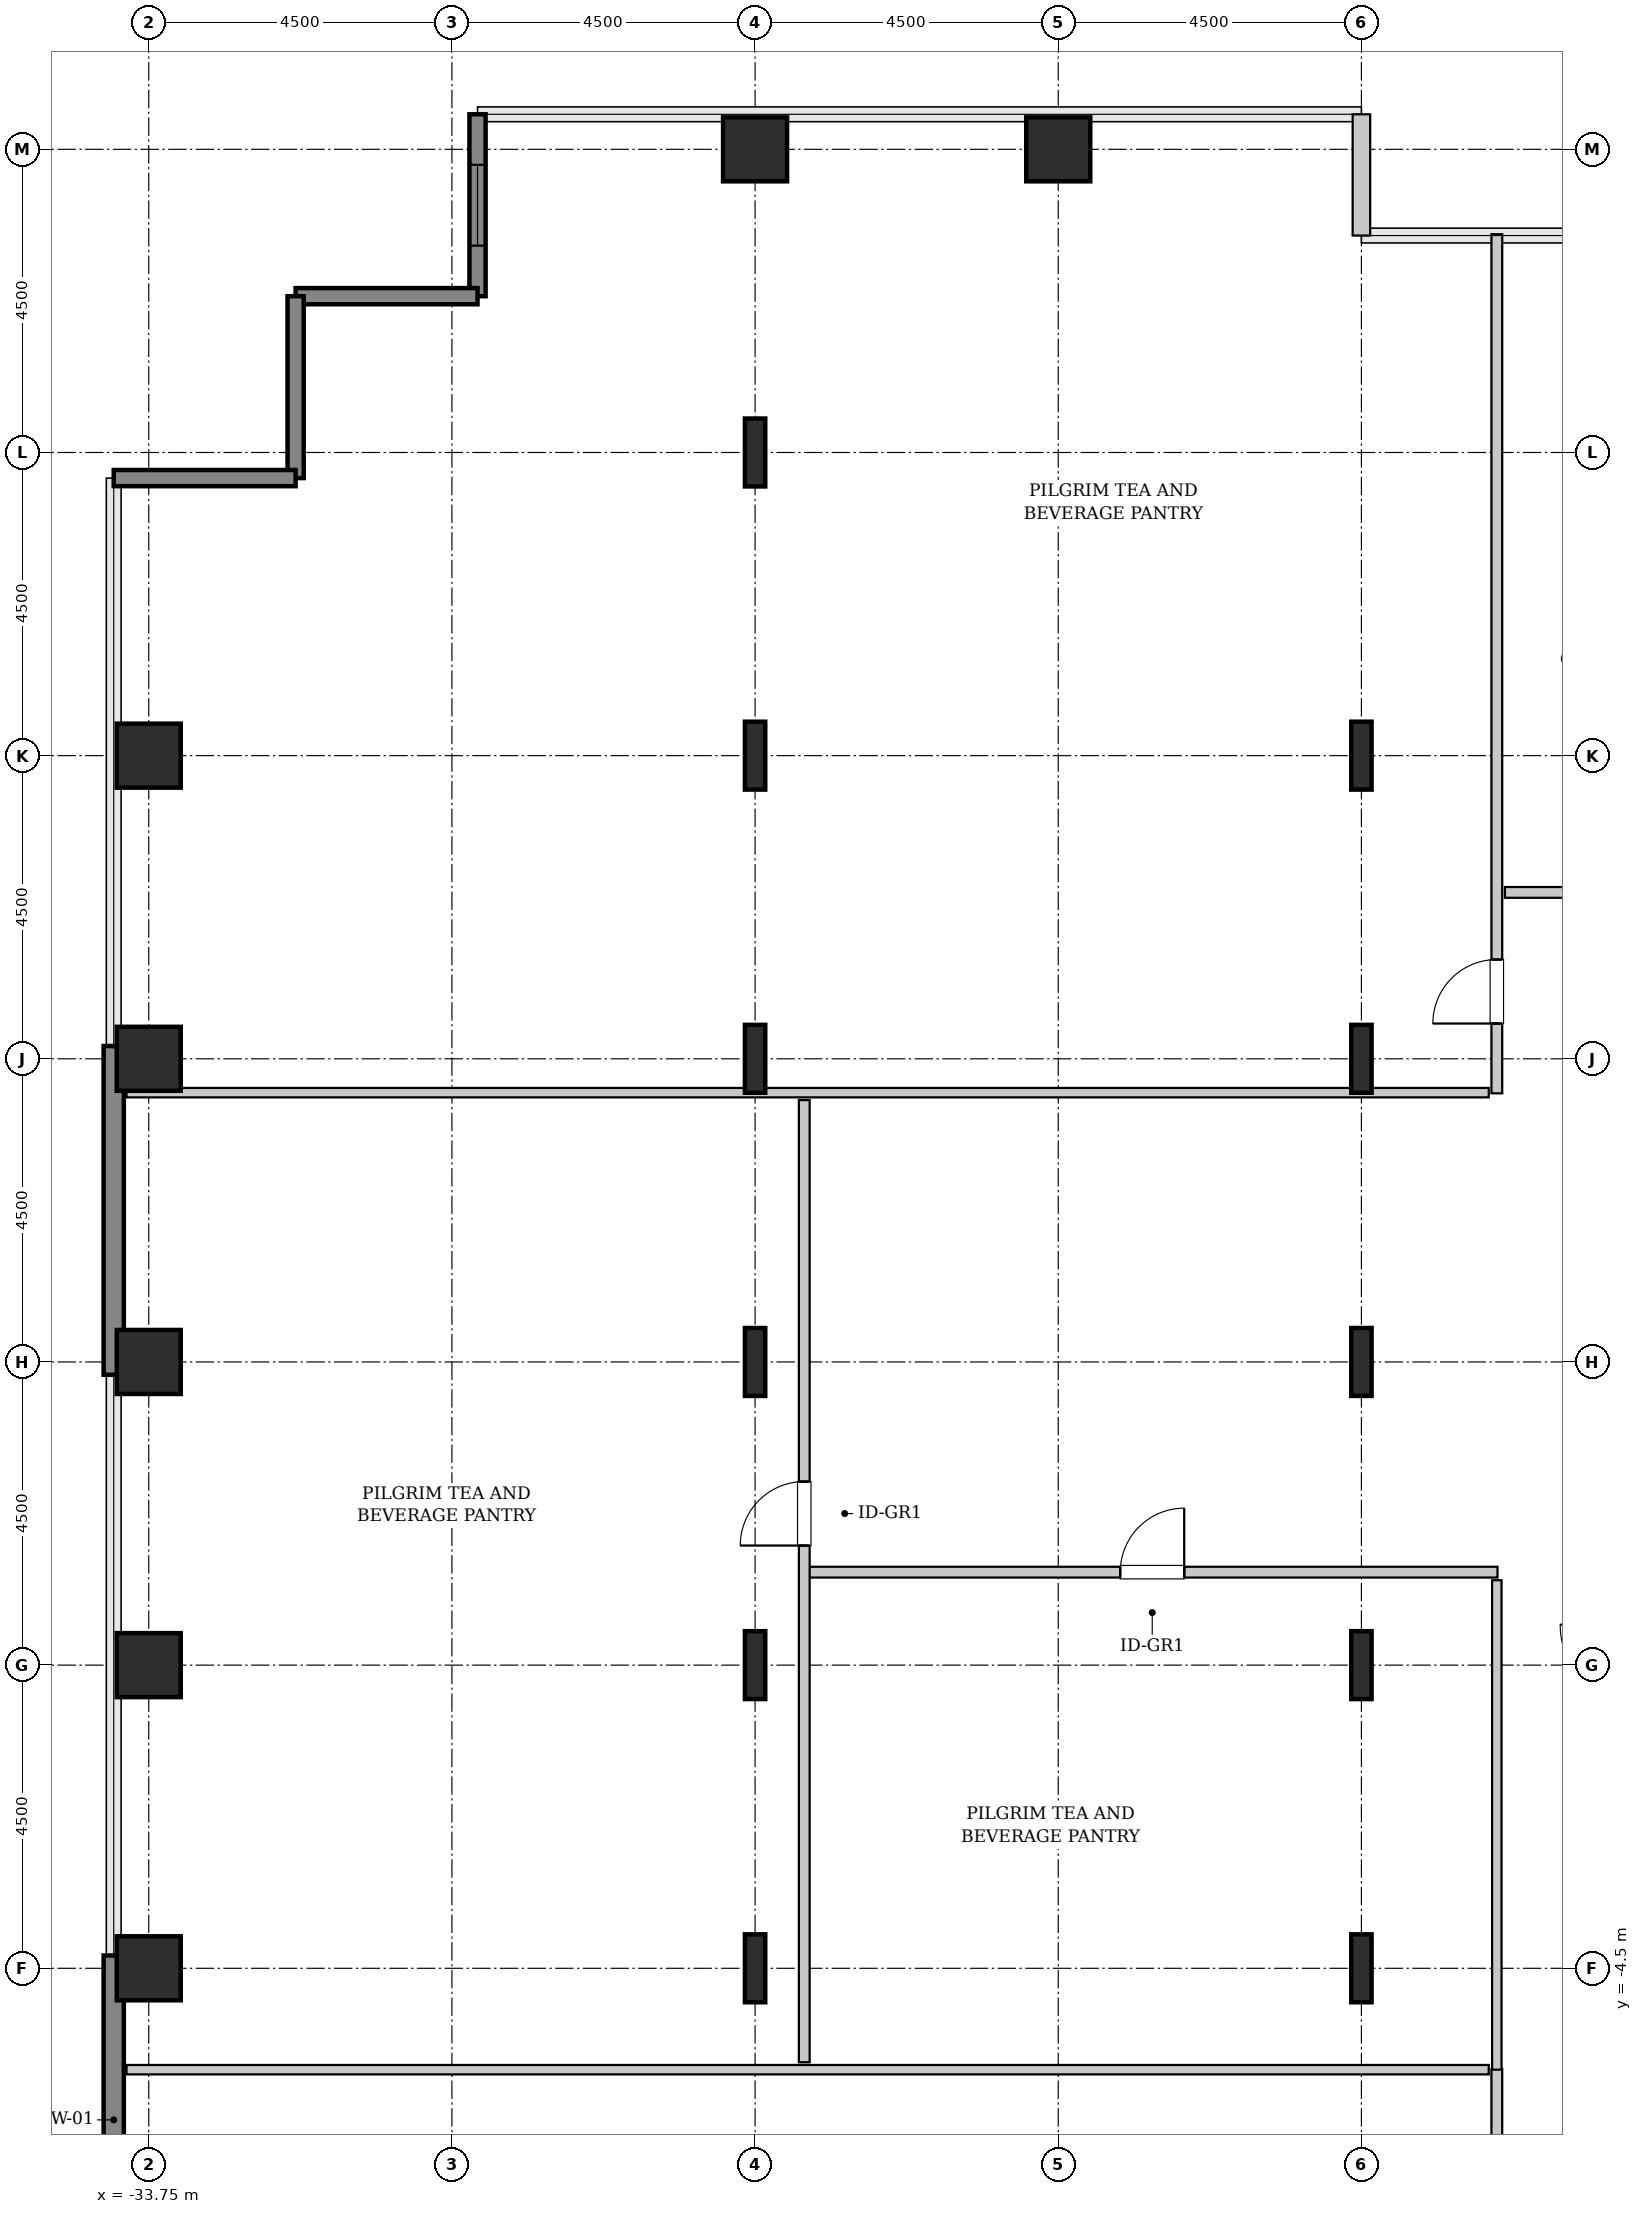
"""IFC4 building model, lengths in metres.
Left out: names, types, materials, properties, quantities, classifications, styles, units other than length and angle.
Written with IfcOpenShell. Run it as: python <this file> out.ifc"""

import sys

from ifc_helpers import new_model, si_unit, direction, frame, frame_2d, origin, origin_2d, place, context, subcontext, project, spatial, rectangle, hollow_rectangle, i_section, extrude, source, transform, mapped, element, fill, save


model = new_model("IFC4")
c1 = context("Model", 3, precision=1e-05, world=origin(), true_north=direction((0.0, 1.0)))
c2 = subcontext(c1, "Body", "Model", "MODEL_VIEW")
j1 = project(units=[si_unit("LENGTHUNIT", "METRE"), si_unit("PLANEANGLEUNIT", "RADIAN")], contexts=[c1])
p1 = place(None, origin())
s1 = spatial("IfcSite", under=j1, at=p1, CompositionType="ELEMENT")
p2 = place(p1, origin())
s2 = spatial("IfcBuilding", under=s1, at=p2, CompositionType="ELEMENT")
p3 = place(p2, frame((0.0, 0.0, 55.8)))
s3 = spatial("IfcBuildingStorey", under=s2, at=p3, CompositionType="ELEMENT", Elevation=55.8)
m1 = source(origin(), c2, "Body", "SweptSolid", [
    extrude(hollow_rectangle(XDim=0.95, YDim=0.95, WallThickness=0.045, InnerFilletRadius=0.045, OuterFilletRadius=0.09, at=origin_2d()), origin(), (0.0, 0.0, 1.0), 3.8),
])
for number, where, z_axis, x_axis in (
    (1, (-33.75, -4.5, 0.0), (0.0, 0.0, 1.0), (1.0, 0.0, 0.0)),
    (2, (-33.75, 0.0, 0.0), (0.0, 0.0, 1.0), (1.0, 0.0, 0.0)),
    (3, (-33.75, 4.5, 0.0), (0.0, 0.0, 1.0), (1.0, 0.0, 0.0)),
    (4, (-33.75, 9.0, 0.0), (0.0, 0.0, 1.0), (1.0, 0.0, 0.0)),
    (5, (-33.75, 13.5, 0.0), (0.0, 0.0, 1.0), (1.0, 0.0, 0.0)),
):
    element("IfcColumn", number, at=place(p3, frame(where, z_axis=z_axis, x_axis=x_axis)), inside=s3, PredefinedType="COLUMN", context=c2, shape_type="MappedRepresentation", body=[
        mapped(m1, transform((0.0, 0.0, 0.0), x_axis=(1.0, 0.0, 0.0), y_axis=(0.0, 1.0, 0.0), z_axis=(0.0, 0.0, 1.0), scale=1.0)),
    ])
m2 = source(origin(), c2, "Body", "SweptSolid", [
    extrude(i_section(OverallWidth=0.302, OverallDepth=1.008, WebThickness=0.021, FlangeThickness=0.04, FilletRadius=0.03, at=origin_2d()), origin(), (0.0, 0.0, 1.0), 3.8),
])
for number, where, z_axis, x_axis in (
    (6, (-24.75, -4.5, 0.0), (0.0, 0.0, 1.0), (1.0, 0.0, 0.0)),
    (7, (-24.75, 0.0, 0.0), (0.0, 0.0, 1.0), (1.0, 0.0, 0.0)),
    (8, (-24.75, 4.5, 0.0), (0.0, 0.0, 1.0), (1.0, 0.0, 0.0)),
    (9, (-24.75, 9.0, 0.0), (0.0, 0.0, 1.0), (1.0, 0.0, 0.0)),
    (10, (-24.75, 13.5, 0.0), (0.0, 0.0, 1.0), (1.0, 0.0, 0.0)),
    (11, (-24.75, 18.0, 0.0), (0.0, 0.0, 1.0), (1.0, 0.0, 0.0)),
):
    element("IfcColumn", number, at=place(p3, frame(where, z_axis=z_axis, x_axis=x_axis)), inside=s3, PredefinedType="COLUMN", context=c2, shape_type="MappedRepresentation", body=[
        mapped(m2, transform((0.0, 0.0, 0.0), x_axis=(1.0, 0.0, 0.0), y_axis=(0.0, 1.0, 0.0), z_axis=(0.0, 0.0, 1.0), scale=1.0)),
    ])
for number, where, z_axis, x_axis in (
    (12, (-24.75, 22.5, 0.0), (0.0, 0.0, 1.0), (1.0, 0.0, 0.0)),
    (13, (-20.25, 22.5, 0.0), (0.0, 0.0, 1.0), (1.0, 0.0, 0.0)),
):
    element("IfcColumn", number, at=place(p3, frame(where, z_axis=z_axis, x_axis=x_axis)), inside=s3, PredefinedType="COLUMN", context=c2, shape_type="MappedRepresentation", body=[
        mapped(m1, transform((0.0, 0.0, 0.0), x_axis=(1.0, 0.0, 0.0), y_axis=(0.0, 1.0, 0.0), z_axis=(0.0, 0.0, 1.0), scale=1.0)),
    ])
for number, where, z_axis, x_axis in (
    (14, (-15.75, -4.5, 0.0), (0.0, 0.0, 1.0), (1.0, 0.0, 0.0)),
    (15, (-15.75, 0.0, 0.0), (0.0, 0.0, 1.0), (1.0, 0.0, 0.0)),
    (16, (-15.75, 4.5, 0.0), (0.0, 0.0, 1.0), (1.0, 0.0, 0.0)),
    (17, (-15.75, 9.0, 0.0), (0.0, 0.0, 1.0), (1.0, 0.0, 0.0)),
    (18, (-15.75, 13.5, 0.0), (0.0, 0.0, 1.0), (1.0, 0.0, 0.0)),
):
    element("IfcColumn", number, at=place(p3, frame(where, z_axis=z_axis, x_axis=x_axis)), inside=s3, PredefinedType="COLUMN", context=c2, shape_type="MappedRepresentation", body=[
        mapped(m2, transform((0.0, 0.0, 0.0), x_axis=(1.0, 0.0, 0.0), y_axis=(0.0, 1.0, 0.0), z_axis=(0.0, 0.0, 1.0), scale=1.0)),
    ])
m3 = source(origin(), c2, "Body", "SweptSolid", [
    extrude(rectangle(XDim=4.88, YDim=0.3, at=frame_2d((2.44, 0.0))), origin(), (0.0, 0.0, 1.0), 3.55),
])
for number, where, z_axis, x_axis in (
    (19, (-34.27, -9.19, 0.0), (0.0, 0.0, 1.0), (0.0, 1.0, 0.0)),
    (20, (-34.27, 4.31, 0.0), (0.0, 0.0, 1.0), (0.0, 1.0, 0.0)),
):
    element("IfcWall", number, at=place(p3, frame(where, z_axis=z_axis, x_axis=x_axis)), inside=s3, PredefinedType="SHEAR", context=c2, shape_type="MappedRepresentation", body=[
        mapped(m3, transform((0.0, 0.0, 0.0), x_axis=(1.0, 0.0, 0.0), y_axis=(0.0, 1.0, 0.0), z_axis=(0.0, 0.0, 1.0), scale=1.0)),
    ])
m4 = source(origin(), c2, "Body", "SweptSolid", [
    extrude(rectangle(XDim=1.8, YDim=0.26, at=frame_2d((0.9, 0.0))), origin(), (0.0, 0.0, 1.0), 3.55),
])
p4 = place(p3, frame((-15.75, 21.22, 0.0), z_axis=(0.0, 0.0, 1.0), x_axis=(0.0, 1.0, 0.0)))
e21 = element("IfcWall", 21, at=p4, inside=s3, PredefinedType="SOLIDWALL", context=c2, shape_type="MappedRepresentation", body=[
    mapped(m4, transform((0.0, 0.0, 0.0), x_axis=(1.0, 0.0, 0.0), y_axis=(0.0, 1.0, 0.0), z_axis=(0.0, 0.0, 1.0), scale=1.0)),
])
m5 = source(origin(), c2, "Body", "SweptSolid", [
    extrude(rectangle(XDim=2.7, YDim=0.24, at=frame_2d((1.35, 0.0))), origin(), (0.0, 0.0, 1.0), 3.55),
])
p5 = place(p3, frame((-28.87, 23.02, 0.0), z_axis=(0.0, 0.0, 1.0), x_axis=(0.0, -1.0, 0.0)))
e22 = element("IfcWall", 22, at=p5, inside=s3, PredefinedType="SHEAR", context=c2, shape_type="MappedRepresentation", body=[
    mapped(m5, transform((0.0, 0.0, 0.0), x_axis=(1.0, 0.0, 0.0), y_axis=(0.0, 1.0, 0.0), z_axis=(0.0, 0.0, 1.0), scale=1.0)),
])
p6 = place(p5, frame((0.75, 0.0, 0.85)))
e23 = element("IfcOpeningElement", 23, at=p6, cuts=e22, PredefinedType="OPENING", context=c2, shape_type="SweptSolid", body=[
    extrude(rectangle(XDim=1.2, YDim=1.8, at=frame_2d((0.6, 0.9))), frame((0.0, 0.13, 0.0), z_axis=(0.0, -1.0, 0.0), x_axis=(1.0, 0.0, 0.0)), (0.0, 0.0, 1.0), 0.26),
])
for number, where, z_axis, x_axis in (
    (24, (-28.87, 20.32, 0.0), (0.0, 0.0, 1.0), (-1.0, 0.0, 0.0)),
    (25, (-31.57, 20.32, 0.0), (0.0, 0.0, 1.0), (0.0, -1.0, 0.0)),
    (26, (-31.57, 17.62, 0.0), (0.0, 0.0, 1.0), (-1.0, 0.0, 0.0)),
):
    element("IfcWall", number, at=place(p3, frame(where, z_axis=z_axis, x_axis=x_axis)), inside=s3, PredefinedType="SHEAR", context=c2, shape_type="MappedRepresentation", body=[
        mapped(m5, transform((0.0, 0.0, 0.0), x_axis=(1.0, 0.0, 0.0), y_axis=(0.0, 1.0, 0.0), z_axis=(0.0, 0.0, 1.0), scale=1.0)),
    ])
m6 = source(origin(), c2, "Body", "SweptSolid", [
    extrude(rectangle(XDim=15.245, YDim=0.16, at=frame_2d((7.623, 0.0))), origin(), (0.0, 0.0, 1.0), 3.535),
])
p7 = place(p3, frame((-13.74, -21.24, 0.0), z_axis=(0.0, 0.0, 1.0), x_axis=(0.0, 1.0, 0.0)))
e27 = element("IfcWall", 27, at=p7, inside=s3, PredefinedType="PARTITIONING", context=c2, shape_type="MappedRepresentation", body=[
    mapped(m6, transform((0.0, 0.0, 0.0), x_axis=(1.0, 0.0, 0.0), y_axis=(0.0, 1.0, 0.0), z_axis=(0.0, 0.0, 1.0), scale=1.0)),
])
p8 = place(p7, frame((12.012, 0.0, 0.0)))
e28 = element("IfcOpeningElement", 28, at=p8, cuts=e27, PredefinedType="OPENING", context=c2, shape_type="SweptSolid", body=[
    extrude(rectangle(XDim=0.95, YDim=2.1, at=frame_2d((0.475, 1.05))), frame((0.0, 0.09, 0.0), z_axis=(0.0, -1.0, 0.0), x_axis=(1.0, 0.0, 0.0)), (0.0, 0.0, 1.0), 0.18),
])
m7 = source(origin(), c2, "Body", "SweptSolid", [
    extrude(rectangle(XDim=20.22, YDim=0.14, at=frame_2d((10.11, 0.0))), origin(), (0.0, 0.0, 1.0), 3.535),
])
p9 = place(p3, frame((-34.08, -6.005, 0.0), z_axis=(0.0, 0.0, 1.0), x_axis=(1.0, 0.0, 0.0)))
e29 = element("IfcWall", 29, at=p9, inside=s3, PredefinedType="PARTITIONING", context=c2, shape_type="MappedRepresentation", body=[
    mapped(m7, transform((0.0, 0.0, 0.0), x_axis=(1.0, 0.0, 0.0), y_axis=(0.0, 1.0, 0.0), z_axis=(0.0, 0.0, 1.0), scale=1.0)),
])
m8 = source(origin(), c2, "Body", "SweptSolid", [
    extrude(rectangle(XDim=12.752, YDim=0.16, at=frame_2d((6.376, 0.0))), origin(), (0.0, 0.0, 1.0), 3.535),
])
p10 = place(p3, frame((-13.74, 8.488, 0.0), z_axis=(0.0, 0.0, 1.0), x_axis=(0.0, 1.0, 0.0)))
e30 = element("IfcWall", 30, at=p10, inside=s3, PredefinedType="PARTITIONING", context=c2, shape_type="MappedRepresentation", body=[
    mapped(m8, transform((0.0, 0.0, 0.0), x_axis=(1.0, 0.0, 0.0), y_axis=(0.0, 1.0, 0.0), z_axis=(0.0, 0.0, 1.0), scale=1.0)),
])
p11 = place(p10, frame((1.036, 0.0, 0.0)))
e31 = element("IfcOpeningElement", 31, at=p11, cuts=e30, PredefinedType="OPENING", context=c2, shape_type="SweptSolid", body=[
    extrude(rectangle(XDim=0.95, YDim=2.1, at=frame_2d((0.475, 1.05))), frame((0.0, 0.09, 0.0), z_axis=(0.0, -1.0, 0.0), x_axis=(1.0, 0.0, 0.0)), (0.0, 0.0, 1.0), 0.18),
])
m9 = source(origin(), c2, "Body", "SweptSolid", [
    extrude(rectangle(XDim=20.22, YDim=0.14, at=frame_2d((10.11, 0.0))), origin(), (0.0, 0.0, 1.0), 2.825),
])
p12 = place(p3, frame((-34.08, 8.498, 0.0), z_axis=(0.0, 0.0, 1.0), x_axis=(1.0, 0.0, 0.0)))
e32 = element("IfcWall", 32, at=p12, inside=s3, PredefinedType="PARTITIONING", context=c2, shape_type="MappedRepresentation", body=[
    mapped(m9, transform((0.0, 0.0, 0.0), x_axis=(1.0, 0.0, 0.0), y_axis=(0.0, 1.0, 0.0), z_axis=(0.0, 0.0, 1.0), scale=1.0)),
])
m10 = source(origin(), c2, "Body", "SweptSolid", [
    extrude(rectangle(XDim=10.25, YDim=0.16, at=frame_2d((5.125, 0.0))), origin(), (0.0, 0.0, 1.0), 3.535),
])
p13 = place(p3, frame((-23.98, 1.38, 0.0), z_axis=(0.0, 0.0, 1.0), x_axis=(1.0, 0.0, 0.0)))
e33 = element("IfcWall", 33, at=p13, inside=s3, PredefinedType="PARTITIONING", context=c2, shape_type="MappedRepresentation", body=[
    mapped(m10, transform((0.0, 0.0, 0.0), x_axis=(1.0, 0.0, 0.0), y_axis=(0.0, 1.0, 0.0), z_axis=(0.0, 0.0, 1.0), scale=1.0)),
])
p14 = place(p13, frame((4.65, 0.0, 0.0)))
e34 = element("IfcOpeningElement", 34, at=p14, cuts=e33, PredefinedType="OPENING", context=c2, shape_type="SweptSolid", body=[
    extrude(rectangle(XDim=0.95, YDim=2.1, at=frame_2d((0.475, 1.05))), frame((0.0, 0.09, 0.0), z_axis=(0.0, -1.0, 0.0), x_axis=(1.0, 0.0, 0.0)), (0.0, 0.0, 1.0), 0.18),
])
m11 = source(origin(), c2, "Body", "SweptSolid", [
    extrude(rectangle(XDim=7.265, YDim=0.14, at=frame_2d((3.632, 0.0))), origin(), (0.0, 0.0, 1.0), 3.535),
])
p15 = place(p3, frame((-13.74, -6.005, 0.0), z_axis=(0.0, 0.0, 1.0), x_axis=(0.0, 1.0, 0.0)))
e35 = element("IfcWall", 35, at=p15, inside=s3, PredefinedType="PARTITIONING", context=c2, shape_type="MappedRepresentation", body=[
    mapped(m11, transform((0.0, 0.0, 0.0), x_axis=(1.0, 0.0, 0.0), y_axis=(0.0, 1.0, 0.0), z_axis=(0.0, 0.0, 1.0), scale=1.0)),
])
m12 = source(origin(), c2, "Body", "SweptSolid", [
    extrude(rectangle(XDim=14.282, YDim=0.16, at=frame_2d((7.141, 0.0))), origin(), (0.0, 0.0, 1.0), 3.535),
])
p16 = place(p3, frame((-24.02, -5.895, 0.0), z_axis=(0.0, 0.0, 1.0), x_axis=(0.0, 1.0, 0.0)))
e36 = element("IfcWall", 36, at=p16, inside=s3, PredefinedType="PARTITIONING", context=c2, shape_type="MappedRepresentation", body=[
    mapped(m12, transform((0.0, 0.0, 0.0), x_axis=(1.0, 0.0, 0.0), y_axis=(0.0, 1.0, 0.0), z_axis=(0.0, 0.0, 1.0), scale=1.0)),
])
p17 = place(p16, frame((7.67, 0.0, 0.0)))
e37 = element("IfcOpeningElement", 37, at=p17, cuts=e36, PredefinedType="OPENING", context=c2, shape_type="SweptSolid", body=[
    extrude(rectangle(XDim=0.95, YDim=2.1, at=frame_2d((0.475, 1.05))), frame((0.0, 0.09, 0.0), z_axis=(0.0, -1.0, 0.0), x_axis=(1.0, 0.0, 0.0)), (0.0, 0.0, 1.0), 0.18),
])
m13 = source(origin(), c2, "Body", "SweptSolid", [
    extrude(rectangle(XDim=4.125, YDim=0.16, at=frame_2d((2.062, 0.0))), origin(), (0.0, 0.0, 1.0), 3.535),
])
p18 = place(p3, frame((-13.62, 11.47, 0.0), z_axis=(0.0, 0.0, 1.0), x_axis=(1.0, 0.0, 0.0)))
e38 = element("IfcWall", 38, at=p18, inside=s3, PredefinedType="PARTITIONING", context=c2, shape_type="MappedRepresentation", body=[
    mapped(m13, transform((0.0, 0.0, 0.0), x_axis=(1.0, 0.0, 0.0), y_axis=(0.0, 1.0, 0.0), z_axis=(0.0, 0.0, 1.0), scale=1.0)),
])
p19 = place(p18, frame((1.587, 0.0, 0.0)))
e39 = element("IfcOpeningElement", 39, at=p19, cuts=e38, PredefinedType="OPENING", context=c2, shape_type="SweptSolid", body=[
    extrude(rectangle(XDim=0.95, YDim=2.1, at=frame_2d((0.475, 1.05))), frame((0.0, 0.09, 0.0), z_axis=(0.0, -1.0, 0.0), x_axis=(1.0, 0.0, 0.0)), (0.0, 0.0, 1.0), 0.18),
])
m14 = source(origin(), c2, "Body", "SweptSolid", [
    extrude(rectangle(XDim=1.2, YDim=1.8, at=frame_2d((0.6, 0.9))), frame((0.0, 0.03, 0.0), z_axis=(0.0, -1.0, 0.0), x_axis=(1.0, 0.0, 0.0)), (0.0, 0.0, 1.0), 0.06),
])
p20 = place(p6, origin())
e40 = element("IfcWindow", 40, at=p20, inside=s3, PartitioningType="SINGLE_PANEL", PredefinedType="WINDOW", context=c2, shape_type="MappedRepresentation", body=[
    mapped(m14, transform((0.0, 0.0, 0.0), x_axis=(1.0, 0.0, 0.0), y_axis=(0.0, 1.0, 0.0), z_axis=(0.0, 0.0, 1.0), scale=1.0)),
])
fill(e23, e40)
m15 = source(origin(), c2, "Body", "SweptSolid", [
    extrude(rectangle(XDim=0.95, YDim=2.1, at=frame_2d((0.475, 1.05))), frame((0.0, 0.025, 0.0), z_axis=(0.0, -1.0, 0.0), x_axis=(1.0, 0.0, 0.0)), (0.0, 0.0, 1.0), 0.05),
])
p21 = place(p11, origin())
e41 = element("IfcDoor", 41, at=p21, inside=s3, OperationType="SINGLE_SWING_LEFT", PredefinedType="DOOR", context=c2, shape_type="MappedRepresentation", body=[
    mapped(m15, transform((0.0, 0.0, 0.0), x_axis=(1.0, 0.0, 0.0), y_axis=(0.0, 1.0, 0.0), z_axis=(0.0, 0.0, 1.0), scale=1.0)),
])
fill(e31, e41)
p22 = place(p14, origin())
e42 = element("IfcDoor", 42, at=p22, inside=s3, OperationType="SINGLE_SWING_RIGHT", PredefinedType="DOOR", context=c2, shape_type="MappedRepresentation", body=[
    mapped(m15, transform((0.0, 0.0, 0.0), x_axis=(1.0, 0.0, 0.0), y_axis=(0.0, 1.0, 0.0), z_axis=(0.0, 0.0, 1.0), scale=1.0)),
])
fill(e34, e42)
p23 = place(p17, origin())
e43 = element("IfcDoor", 43, at=p23, inside=s3, OperationType="SINGLE_SWING_LEFT", PredefinedType="DOOR", context=c2, shape_type="MappedRepresentation", body=[
    mapped(m15, transform((0.0, 0.0, 0.0), x_axis=(1.0, 0.0, 0.0), y_axis=(0.0, 1.0, 0.0), z_axis=(0.0, 0.0, 1.0), scale=1.0)),
])
fill(e37, e43)
save(model, sys.argv[1])
